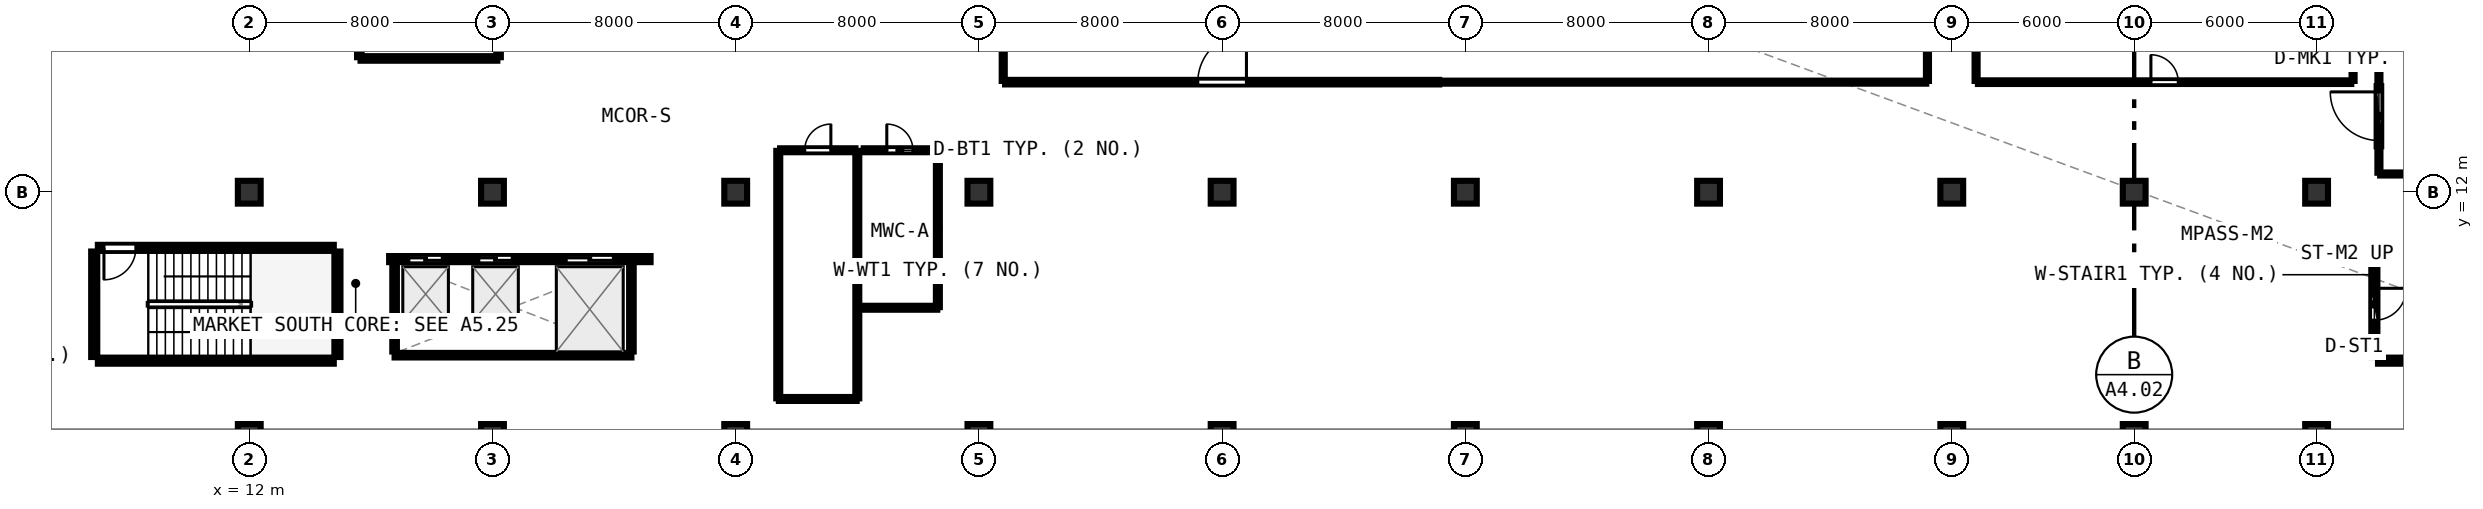
"""IFC4 building model, lengths in metres.
Left out: names, types, materials, properties, quantities, classifications, styles, units other than length and angle.
Written with IfcOpenShell. Run it as: python <this file> out.ifc"""

import sys

from ifc_helpers import new_model, si_unit, direction, frame, frame_2d, origin, origin_2d, place, context, subcontext, project, spatial, rectangle, extrude, element, fill, save


model = new_model("IFC4")
c1 = context("Model", 3, precision=1e-05, world=origin(), true_north=direction((0.0, 1.0)))
c2 = subcontext(c1, "Body", "Model", "MODEL_VIEW")
j1 = project(units=[si_unit("LENGTHUNIT", "METRE"), si_unit("PLANEANGLEUNIT", "RADIAN")], contexts=[c1])
p1 = place(None, origin())
s1 = spatial("IfcSite", under=j1, at=p1, CompositionType="ELEMENT")
p2 = place(p1, origin())
s2 = spatial("IfcBuilding", under=s1, at=p2, CompositionType="ELEMENT")
p3 = place(p2, origin())
s3 = spatial("IfcBuildingStorey", under=s2, at=p3, CompositionType="ELEMENT", Elevation=0.0)
for number, where, z_axis, x_axis in (
    (1, (12.0, 4.0, 0.0), (0.0, 0.0, 1.0), (1.0, 0.0, 0.0)),
    (2, (12.0, 12.0, 0.0), (0.0, 0.0, 1.0), (1.0, 0.0, 0.0)),
    (3, (20.0, 4.0, 0.0), (0.0, 0.0, 1.0), (1.0, 0.0, 0.0)),
    (4, (20.0, 12.0, 0.0), (0.0, 0.0, 1.0), (1.0, 0.0, 0.0)),
    (5, (28.0, 4.0, 0.0), (0.0, 0.0, 1.0), (1.0, 0.0, 0.0)),
    (6, (28.0, 12.0, 0.0), (0.0, 0.0, 1.0), (1.0, 0.0, 0.0)),
    (7, (36.0, 4.0, 0.0), (0.0, 0.0, 1.0), (1.0, 0.0, 0.0)),
    (8, (36.0, 12.0, 0.0), (0.0, 0.0, 1.0), (1.0, 0.0, 0.0)),
    (9, (44.0, 4.0, 0.0), (0.0, 0.0, 1.0), (1.0, 0.0, 0.0)),
    (10, (44.0, 12.0, 0.0), (0.0, 0.0, 1.0), (1.0, 0.0, 0.0)),
    (11, (52.0, 4.0, 0.0), (0.0, 0.0, 1.0), (1.0, 0.0, 0.0)),
    (12, (52.0, 12.0, 0.0), (0.0, 0.0, 1.0), (1.0, 0.0, 0.0)),
    (13, (60.0, 4.0, 0.0), (0.0, 0.0, 1.0), (1.0, 0.0, 0.0)),
    (14, (60.0, 12.0, 0.0), (0.0, 0.0, 1.0), (1.0, 0.0, 0.0)),
    (15, (68.0, 4.0, 0.0), (0.0, 0.0, 1.0), (1.0, 0.0, 0.0)),
    (16, (68.0, 12.0, 0.0), (0.0, 0.0, 1.0), (1.0, 0.0, 0.0)),
    (17, (74.0, 4.0, 0.0), (0.0, 0.0, 1.0), (1.0, 0.0, 0.0)),
    (18, (74.0, 12.0, 0.0), (0.0, 0.0, 1.0), (1.0, 0.0, 0.0)),
    (19, (80.0, 4.0, 0.0), (0.0, 0.0, 1.0), (1.0, 0.0, 0.0)),
    (20, (80.0, 12.0, 0.0), (0.0, 0.0, 1.0), (1.0, 0.0, 0.0)),
):
    element("IfcColumn", number, at=place(p3, frame(where, z_axis=z_axis, x_axis=x_axis)), inside=s3, PredefinedType="COLUMN", context=c2, shape_type="SweptSolid", body=[
        extrude(rectangle(XDim=0.75, YDim=0.75, at=origin_2d()), origin(), (0.0, 0.0, 1.0), 4.5),
    ])
p4 = place(p3, frame((7.02, 6.46, 0.0), z_axis=(0.0, 0.0, 1.0), x_axis=(1.0, 0.0, 0.0)))
e21 = element("IfcWall", 21, at=p4, inside=s3, PredefinedType="SHEAR", context=c2, shape_type="SweptSolid", body=[
    extrude(rectangle(XDim=7.76, YDim=0.2, at=frame_2d((3.88, 0.0))), origin(), (0.0, 0.0, 1.0), 4.24),
])
p5 = place(p3, frame((14.9, 6.58, 0.0), z_axis=(0.0, 0.0, 1.0), x_axis=(0.0, 1.0, 0.0)))
e22 = element("IfcWall", 22, at=p5, inside=s3, PredefinedType="SHEAR", context=c2, shape_type="SweptSolid", body=[
    extrude(rectangle(XDim=3.47, YDim=0.2, at=frame_2d((1.735, 0.0))), origin(), (0.0, 0.0, 1.0), 4.24),
])
p6 = place(p3, frame((14.78, 10.17, 0.0), z_axis=(0.0, 0.0, 1.0), x_axis=(-1.0, 0.0, 0.0)))
e23 = element("IfcWall", 23, at=p6, inside=s3, PredefinedType="SHEAR", context=c2, shape_type="SweptSolid", body=[
    extrude(rectangle(XDim=7.76, YDim=0.2, at=frame_2d((3.88, 0.0))), origin(), (0.0, 0.0, 1.0), 4.24),
])
p7 = place(p6, frame((6.51, 0.0, 0.0)))
e24 = element("IfcOpeningElement", 24, at=p7, cuts=e23, PredefinedType="OPENING", context=c2, shape_type="SweptSolid", body=[
    extrude(rectangle(XDim=1.05, YDim=2.1, at=frame_2d((0.525, 1.05))), frame((0.0, 0.11, 0.0), z_axis=(0.0, -1.0, 0.0), x_axis=(1.0, 0.0, 0.0)), (0.0, 0.0, 1.0), 0.22),
])
p8 = place(p3, frame((6.9, 10.05, 0.0), z_axis=(0.0, 0.0, 1.0), x_axis=(0.0, -1.0, 0.0)))
e25 = element("IfcWall", 25, at=p8, inside=s3, PredefinedType="SHEAR", context=c2, shape_type="SweptSolid", body=[
    extrude(rectangle(XDim=3.47, YDim=0.2, at=frame_2d((1.735, 0.0))), origin(), (0.0, 0.0, 1.0), 4.24),
])
for number, where, z_axis, x_axis in (
    (26, (82.02, 6.46, 0.0), (0.0, 0.0, 1.0), (1.0, 0.0, 0.0)),
    (27, (89.78, 10.17, 0.0), (0.0, 0.0, 1.0), (-1.0, 0.0, 0.0)),
):
    element("IfcWall", number, at=place(p3, frame(where, z_axis=z_axis, x_axis=x_axis)), inside=s3, PredefinedType="SHEAR", context=c2, shape_type="SweptSolid", body=[
        extrude(rectangle(XDim=7.76, YDim=0.2, at=frame_2d((3.88, 0.0))), origin(), (0.0, 0.0, 1.0), 4.24),
    ])
p9 = place(p3, frame((81.9, 10.05, 0.0), z_axis=(0.0, 0.0, 1.0), x_axis=(0.0, -1.0, 0.0)))
e28 = element("IfcWall", 28, at=p9, inside=s3, PredefinedType="SHEAR", context=c2, shape_type="SweptSolid", body=[
    extrude(rectangle(XDim=3.47, YDim=0.2, at=frame_2d((1.735, 0.0))), origin(), (0.0, 0.0, 1.0), 4.24),
])
p10 = place(p9, frame((1.21, 0.0, 0.0)))
e29 = element("IfcOpeningElement", 29, at=p10, cuts=e28, PredefinedType="OPENING", context=c2, shape_type="SweptSolid", body=[
    extrude(rectangle(XDim=1.05, YDim=2.1, at=frame_2d((0.525, 1.05))), frame((0.0, 0.11, 0.0), z_axis=(0.0, -1.0, 0.0), x_axis=(1.0, 0.0, 0.0)), (0.0, 0.0, 1.0), 0.22),
])
p11 = place(p3, frame((16.6, 9.8, 0.0), z_axis=(0.0, 0.0, 1.0), x_axis=(1.0, 0.0, 0.0)))
e30 = element("IfcWall", 30, at=p11, inside=s3, PredefinedType="SOLIDWALL", context=c2, shape_type="SweptSolid", body=[
    extrude(rectangle(XDim=8.6, YDim=0.2, at=frame_2d((4.3, 0.0))), origin(), (0.0, 0.0, 1.0), 3.425),
])
p12 = place(p11, frame((0.65, 0.0, 0.0)))
e31 = element("IfcOpeningElement", 31, at=p12, cuts=e30, PredefinedType="OPENING", context=c2, shape_type="SweptSolid", body=[
    extrude(rectangle(XDim=1.1, YDim=2.1, at=frame_2d((0.55, 1.05))), frame((0.0, 0.11, 0.0), z_axis=(0.0, -1.0, 0.0), x_axis=(1.0, 0.0, 0.0)), (0.0, 0.0, 1.0), 0.22),
])
p13 = place(p11, frame((2.95, 0.0, 0.0)))
e32 = element("IfcOpeningElement", 32, at=p13, cuts=e30, PredefinedType="OPENING", context=c2, shape_type="SweptSolid", body=[
    extrude(rectangle(XDim=1.1, YDim=2.1, at=frame_2d((0.55, 1.05))), frame((0.0, 0.11, 0.0), z_axis=(0.0, -1.0, 0.0), x_axis=(1.0, 0.0, 0.0)), (0.0, 0.0, 1.0), 0.22),
])
p14 = place(p11, frame((5.825, 0.0, 0.0)))
e33 = element("IfcOpeningElement", 33, at=p14, cuts=e30, PredefinedType="OPENING", context=c2, shape_type="SweptSolid", body=[
    extrude(rectangle(XDim=1.55, YDim=2.2, at=frame_2d((0.775, 1.1))), frame((0.0, 0.11, 0.0), z_axis=(0.0, -1.0, 0.0), x_axis=(1.0, 0.0, 0.0)), (0.0, 0.0, 1.0), 0.22),
])
p15 = place(p3, frame((16.78, 6.64, 0.0), z_axis=(0.0, 0.0, 1.0), x_axis=(1.0, 0.0, 0.0)))
e34 = element("IfcWall", 34, at=p15, inside=s3, PredefinedType="PARTITIONING", context=c2, shape_type="SweptSolid", body=[
    extrude(rectangle(XDim=7.79, YDim=0.15, at=frame_2d((3.895, 0.0))), origin(), (0.0, 0.0, 1.0), 3.425),
])
for number, where, z_axis, x_axis in (
    (35, (16.78, 6.76, 0.0), (0.0, 0.0, 1.0), (0.0, 1.0, 0.0)),
    (36, (24.57, 6.76, 0.0), (0.0, 0.0, 1.0), (0.0, 1.0, 0.0)),
):
    element("IfcWall", number, at=place(p3, frame(where, z_axis=z_axis, x_axis=x_axis)), inside=s3, PredefinedType="PARTITIONING", context=c2, shape_type="SweptSolid", body=[
        extrude(rectangle(XDim=2.91, YDim=0.15, at=frame_2d((1.455, 0.0))), origin(), (0.0, 0.0, 1.0), 4.23),
    ])
p16 = place(p3, frame((29.46, 13.38, 0.0), z_axis=(0.0, 0.0, 1.0), x_axis=(1.0, 0.0, 0.0)))
e37 = element("IfcWall", 37, at=p16, inside=s3, PredefinedType="PLUMBINGWALL", context=c2, shape_type="SweptSolid", body=[
    extrude(rectangle(XDim=2.48, YDim=0.13, at=frame_2d((1.24, 0.0))), origin(), (0.0, 0.0, 1.0), 4.19),
])
p17 = place(p16, frame((0.81, 0.0, 0.0)))
e38 = element("IfcOpeningElement", 38, at=p17, cuts=e37, PredefinedType="OPENING", context=c2, shape_type="SweptSolid", body=[
    extrude(rectangle(XDim=0.86, YDim=2.05, at=frame_2d((0.43, 1.025))), frame((0.0, 0.075, 0.0), z_axis=(0.0, -1.0, 0.0), x_axis=(1.0, 0.0, 0.0)), (0.0, 0.0, 1.0), 0.15),
])
p18 = place(p3, frame((32.21, 13.38, 0.0), z_axis=(0.0, 0.0, 1.0), x_axis=(1.0, 0.0, 0.0)))
e39 = element("IfcWall", 39, at=p18, inside=s3, PredefinedType="PLUMBINGWALL", context=c2, shape_type="SweptSolid", body=[
    extrude(rectangle(XDim=2.38, YDim=0.13, at=frame_2d((1.19, 0.0))), origin(), (0.0, 0.0, 1.0), 4.19),
])
p19 = place(p18, frame((0.76, 0.0, 0.0)))
e40 = element("IfcOpeningElement", 40, at=p19, cuts=e39, PredefinedType="OPENING", context=c2, shape_type="SweptSolid", body=[
    extrude(rectangle(XDim=0.86, YDim=2.05, at=frame_2d((0.43, 1.025))), frame((0.0, 0.075, 0.0), z_axis=(0.0, -1.0, 0.0), x_axis=(1.0, 0.0, 0.0)), (0.0, 0.0, 1.0), 0.15),
])
p20 = place(p3, frame((36.86, 15.62, 0.0), z_axis=(0.0, 0.0, 1.0), x_axis=(1.0, 0.0, 0.0)))
e41 = element("IfcWall", 41, at=p20, inside=s3, PredefinedType="PARTITIONING", context=c2, shape_type="SweptSolid", body=[
    extrude(rectangle(XDim=14.28, YDim=0.15, at=frame_2d((7.14, 0.0))), origin(), (0.0, 0.0, 1.0), 3.425),
])
p21 = place(p20, frame((6.34, 0.0, 0.0)))
e42 = element("IfcOpeningElement", 42, at=p21, cuts=e41, PredefinedType="OPENING", context=c2, shape_type="SweptSolid", body=[
    extrude(rectangle(XDim=1.6, YDim=2.15, at=frame_2d((0.8, 1.075))), frame((0.0, 0.085, 0.0), z_axis=(0.0, -1.0, 0.0), x_axis=(1.0, 0.0, 0.0)), (0.0, 0.0, 1.0), 0.17),
])
p22 = place(p3, frame((68.86, 15.62, 0.0), z_axis=(0.0, 0.0, 1.0), x_axis=(1.0, 0.0, 0.0)))
e43 = element("IfcWall", 43, at=p22, inside=s3, PredefinedType="PARTITIONING", context=c2, shape_type="SweptSolid", body=[
    extrude(rectangle(XDim=12.28, YDim=0.12, at=frame_2d((6.14, 0.0))), origin(), (0.0, 0.0, 1.0), 3.425),
])
p23 = place(p22, frame((5.69, 0.0, 0.0)))
e44 = element("IfcOpeningElement", 44, at=p23, cuts=e43, PredefinedType="OPENING", context=c2, shape_type="SweptSolid", body=[
    extrude(rectangle(XDim=0.9, YDim=2.08, at=frame_2d((0.45, 1.04))), frame((0.0, 0.07, 0.0), z_axis=(0.0, -1.0, 0.0), x_axis=(1.0, 0.0, 0.0)), (0.0, 0.0, 1.0), 0.14),
])
p24 = place(p3, frame((82.05, 13.51, 0.0), z_axis=(0.0, 0.0, 1.0), x_axis=(0.0, 1.0, 0.0)))
e45 = element("IfcWall", 45, at=p24, inside=s3, PredefinedType="PARTITIONING", context=c2, shape_type="SweptSolid", body=[
    extrude(rectangle(XDim=1.98, YDim=0.15, at=frame_2d((0.99, 0.0))), origin(), (0.0, 0.0, 1.0), 4.19),
])
p25 = place(p24, frame((0.19, 0.0, 0.0)))
e46 = element("IfcOpeningElement", 46, at=p25, cuts=e45, PredefinedType="OPENING", context=c2, shape_type="SweptSolid", body=[
    extrude(rectangle(XDim=1.6, YDim=2.15, at=frame_2d((0.8, 1.075))), frame((0.0, 0.085, 0.0), z_axis=(0.0, -1.0, 0.0), x_axis=(1.0, 0.0, 0.0)), (0.0, 0.0, 1.0), 0.17),
])
p26 = place(p3, frame((29.42, 5.2, 0.0), z_axis=(0.0, 0.0, 1.0), x_axis=(1.0, 0.0, 0.0)))
e47 = element("IfcWall", 47, at=p26, inside=s3, PredefinedType="PLUMBINGWALL", context=c2, shape_type="SweptSolid", body=[
    extrude(rectangle(XDim=2.56, YDim=0.13, at=frame_2d((1.28, 0.0))), origin(), (0.0, 0.0, 1.0), 4.19),
])
for number, where, z_axis, x_axis in (
    (48, (32.0, 5.22, 0.0), (0.0, 0.0, 1.0), (0.0, 1.0, 0.0)),
    (49, (29.4, 13.36, 0.0), (0.0, 0.0, 1.0), (0.0, -1.0, 0.0)),
):
    element("IfcWall", number, at=place(p3, frame(where, z_axis=z_axis, x_axis=x_axis)), inside=s3, PredefinedType="PLUMBINGWALL", context=c2, shape_type="SweptSolid", body=[
        extrude(rectangle(XDim=8.14, YDim=0.13, at=frame_2d((4.07, 0.0))), origin(), (0.0, 0.0, 1.0), 3.425),
    ])
p27 = place(p3, frame((32.17, 8.2, 0.0), z_axis=(0.0, 0.0, 1.0), x_axis=(1.0, 0.0, 0.0)))
e50 = element("IfcWall", 50, at=p27, inside=s3, PredefinedType="PLUMBINGWALL", context=c2, shape_type="SweptSolid", body=[
    extrude(rectangle(XDim=2.46, YDim=0.13, at=frame_2d((1.23, 0.0))), origin(), (0.0, 0.0, 1.0), 4.19),
])
p28 = place(p3, frame((34.65, 8.22, 0.0), z_axis=(0.0, 0.0, 1.0), x_axis=(0.0, 1.0, 0.0)))
e51 = element("IfcWall", 51, at=p28, inside=s3, PredefinedType="PLUMBINGWALL", context=c2, shape_type="SweptSolid", body=[
    extrude(rectangle(XDim=5.14, YDim=0.13, at=frame_2d((2.57, 0.0))), origin(), (0.0, 0.0, 1.0), 3.425),
])
p29 = place(p3, frame((51.14, 15.62, 0.0), z_axis=(0.0, 0.0, 1.0), x_axis=(1.0, 0.0, 0.0)))
e52 = element("IfcWall", 52, at=p29, inside=s3, PredefinedType="PARTITIONING", context=c2, shape_type="SweptSolid", body=[
    extrude(rectangle(XDim=16.02, YDim=0.1, at=frame_2d((8.01, 0.0))), origin(), (0.0, 0.0, 1.0), 3.425),
])
for number, where, z_axis, x_axis in (
    (53, (67.2, 15.66, 0.0), (0.0, 0.0, 1.0), (0.0, 1.0, 0.0)),
    (54, (36.8, 25.16, 0.0), (0.0, 0.0, 1.0), (0.0, -1.0, 0.0)),
    (55, (81.2, 15.66, 0.0), (0.0, 0.0, 1.0), (0.0, 1.0, 0.0)),
    (56, (68.8, 25.16, 0.0), (0.0, 0.0, 1.0), (0.0, -1.0, 0.0)),
):
    element("IfcWall", number, at=place(p3, frame(where, z_axis=z_axis, x_axis=x_axis)), inside=s3, PredefinedType="PARTITIONING", context=c2, shape_type="SweptSolid", body=[
        extrude(rectangle(XDim=9.5, YDim=0.1, at=frame_2d((4.75, 0.0))), origin(), (0.0, 0.0, 1.0), 3.425),
    ])
p30 = place(p3, frame((82.09, 12.6, 0.0), z_axis=(0.0, 0.0, 1.0), x_axis=(1.0, 0.0, 0.0)))
e57 = element("IfcWall", 57, at=p30, inside=s3, PredefinedType="PARTITIONING", context=c2, shape_type="SweptSolid", body=[
    extrude(rectangle(XDim=13.07, YDim=0.1, at=frame_2d((6.535, 0.0))), origin(), (0.0, 0.0, 1.0), 3.425),
])
p31 = place(p3, frame((82.05, 25.16, 0.0), z_axis=(0.0, 0.0, 1.0), x_axis=(0.0, -1.0, 0.0)))
e58 = element("IfcWall", 58, at=p31, inside=s3, PredefinedType="PARTITIONING", context=c2, shape_type="SweptSolid", body=[
    extrude(rectangle(XDim=9.67, YDim=0.1, at=frame_2d((4.835, 0.0))), origin(), (0.0, 0.0, 1.0), 3.425),
])
p32 = place(p3, frame((82.05, 13.51, 0.0), z_axis=(0.0, 0.0, 1.0), x_axis=(0.0, -1.0, 0.0)))
e59 = element("IfcWall", 59, at=p32, inside=s3, PredefinedType="PARTITIONING", context=c2, shape_type="SweptSolid", body=[
    extrude(rectangle(XDim=0.87, YDim=0.1, at=frame_2d((0.435, 0.0))), origin(), (0.0, 0.0, 1.0), 4.19),
])
p33 = place(p3, frame((15.66, 16.4, 0.0), z_axis=(0.0, 0.0, 1.0), x_axis=(1.0, 0.0, 0.0)))
e60 = element("IfcWall", 60, at=p33, inside=s3, PredefinedType="PARTITIONING", context=c2, shape_type="SweptSolid", body=[
    extrude(rectangle(XDim=4.5, YDim=0.15, at=frame_2d((2.25, 0.0))), origin(), (0.0, 0.0, 1.0), 3.425),
])
p34 = place(p3, frame((20.2, 16.44, 0.0), z_axis=(0.0, 0.0, 1.0), x_axis=(0.0, 1.0, 0.0)))
e61 = element("IfcWall", 61, at=p34, inside=s3, PredefinedType="PARTITIONING", context=c2, shape_type="SweptSolid", body=[
    extrude(rectangle(XDim=3.214, YDim=0.15, at=frame_2d((1.607, 0.0))), origin(), (0.0, 0.0, 1.0), 3.425),
])
p35 = place(p3, frame((15.62, 21.46, 0.0), z_axis=(0.0, 0.0, 1.0), x_axis=(0.0, -1.0, 0.0)))
e62 = element("IfcWall", 62, at=p35, inside=s3, PredefinedType="PARTITIONING", context=c2, shape_type="SweptSolid", body=[
    extrude(rectangle(XDim=5.02, YDim=0.15, at=frame_2d((2.51, 0.0))), origin(), (0.0, 0.0, 1.0), 3.425),
])
p36 = place(p7, origin())
e63 = element("IfcDoor", 63, at=p36, inside=s3, OperationType="SINGLE_SWING_RIGHT", PredefinedType="DOOR", context=c2, shape_type="SweptSolid", body=[
    extrude(rectangle(XDim=1.05, YDim=2.1, at=frame_2d((0.525, 1.05))), frame((0.0, 0.025, 0.0), z_axis=(0.0, -1.0, 0.0), x_axis=(1.0, 0.0, 0.0)), (0.0, 0.0, 1.0), 0.05),
])
fill(e24, e63)
p37 = place(p10, origin())
e64 = element("IfcDoor", 64, at=p37, inside=s3, OperationType="SINGLE_SWING_LEFT", PredefinedType="DOOR", context=c2, shape_type="SweptSolid", body=[
    extrude(rectangle(XDim=1.05, YDim=2.1, at=frame_2d((0.525, 1.05))), frame((0.0, 0.025, 0.0), z_axis=(0.0, -1.0, 0.0), x_axis=(1.0, 0.0, 0.0)), (0.0, 0.0, 1.0), 0.05),
])
fill(e29, e64)
p38 = place(p12, origin())
e65 = element("IfcDoor", 65, at=p38, inside=s3, OperationType="DOUBLE_DOOR_SLIDING", PredefinedType="DOOR", context=c2, shape_type="SweptSolid", body=[
    extrude(rectangle(XDim=1.1, YDim=2.1, at=frame_2d((0.55, 1.05))), frame((0.0, 0.025, 0.0), z_axis=(0.0, -1.0, 0.0), x_axis=(1.0, 0.0, 0.0)), (0.0, 0.0, 1.0), 0.05),
])
fill(e31, e65)
p39 = place(p13, origin())
e66 = element("IfcDoor", 66, at=p39, inside=s3, OperationType="DOUBLE_DOOR_SLIDING", PredefinedType="DOOR", context=c2, shape_type="SweptSolid", body=[
    extrude(rectangle(XDim=1.1, YDim=2.1, at=frame_2d((0.55, 1.05))), frame((0.0, 0.025, 0.0), z_axis=(0.0, -1.0, 0.0), x_axis=(1.0, 0.0, 0.0)), (0.0, 0.0, 1.0), 0.05),
])
fill(e32, e66)
p40 = place(p14, origin())
e67 = element("IfcDoor", 67, at=p40, inside=s3, OperationType="DOUBLE_DOOR_SLIDING", PredefinedType="DOOR", context=c2, shape_type="SweptSolid", body=[
    extrude(rectangle(XDim=1.55, YDim=2.2, at=frame_2d((0.775, 1.1))), frame((0.0, 0.025, 0.0), z_axis=(0.0, -1.0, 0.0), x_axis=(1.0, 0.0, 0.0)), (0.0, 0.0, 1.0), 0.05),
])
fill(e33, e67)
p41 = place(p17, origin())
e68 = element("IfcDoor", 68, at=p41, inside=s3, OperationType="SINGLE_SWING_RIGHT", PredefinedType="DOOR", context=c2, shape_type="SweptSolid", body=[
    extrude(rectangle(XDim=0.86, YDim=2.05, at=frame_2d((0.43, 1.025))), frame((0.0, 0.025, 0.0), z_axis=(0.0, -1.0, 0.0), x_axis=(1.0, 0.0, 0.0)), (0.0, 0.0, 1.0), 0.05),
])
fill(e38, e68)
p42 = place(p19, origin())
e69 = element("IfcDoor", 69, at=p42, inside=s3, OperationType="SINGLE_SWING_LEFT", PredefinedType="DOOR", context=c2, shape_type="SweptSolid", body=[
    extrude(rectangle(XDim=0.86, YDim=2.05, at=frame_2d((0.43, 1.025))), frame((0.0, 0.025, 0.0), z_axis=(0.0, -1.0, 0.0), x_axis=(1.0, 0.0, 0.0)), (0.0, 0.0, 1.0), 0.05),
])
fill(e40, e69)
p43 = place(p21, origin())
e70 = element("IfcDoor", 70, at=p43, inside=s3, OperationType="SINGLE_SWING_RIGHT", PredefinedType="DOOR", context=c2, shape_type="SweptSolid", body=[
    extrude(rectangle(XDim=1.6, YDim=2.15, at=frame_2d((0.8, 1.075))), frame((0.0, 0.025, 0.0), z_axis=(0.0, -1.0, 0.0), x_axis=(1.0, 0.0, 0.0)), (0.0, 0.0, 1.0), 0.05),
])
fill(e42, e70)
p44 = place(p23, origin())
e71 = element("IfcDoor", 71, at=p44, inside=s3, OperationType="SINGLE_SWING_LEFT", PredefinedType="DOOR", context=c2, shape_type="SweptSolid", body=[
    extrude(rectangle(XDim=0.9, YDim=2.08, at=frame_2d((0.45, 1.04))), frame((0.0, 0.025, 0.0), z_axis=(0.0, -1.0, 0.0), x_axis=(1.0, 0.0, 0.0)), (0.0, 0.0, 1.0), 0.05),
])
fill(e44, e71)
p45 = place(p25, origin())
e72 = element("IfcDoor", 72, at=p45, inside=s3, OperationType="SINGLE_SWING_RIGHT", PredefinedType="DOOR", context=c2, shape_type="SweptSolid", body=[
    extrude(rectangle(XDim=1.6, YDim=2.15, at=frame_2d((0.8, 1.075))), frame((0.0, 0.025, 0.0), z_axis=(0.0, -1.0, 0.0), x_axis=(1.0, 0.0, 0.0)), (0.0, 0.0, 1.0), 0.05),
])
fill(e46, e72)
save(model, sys.argv[1])
